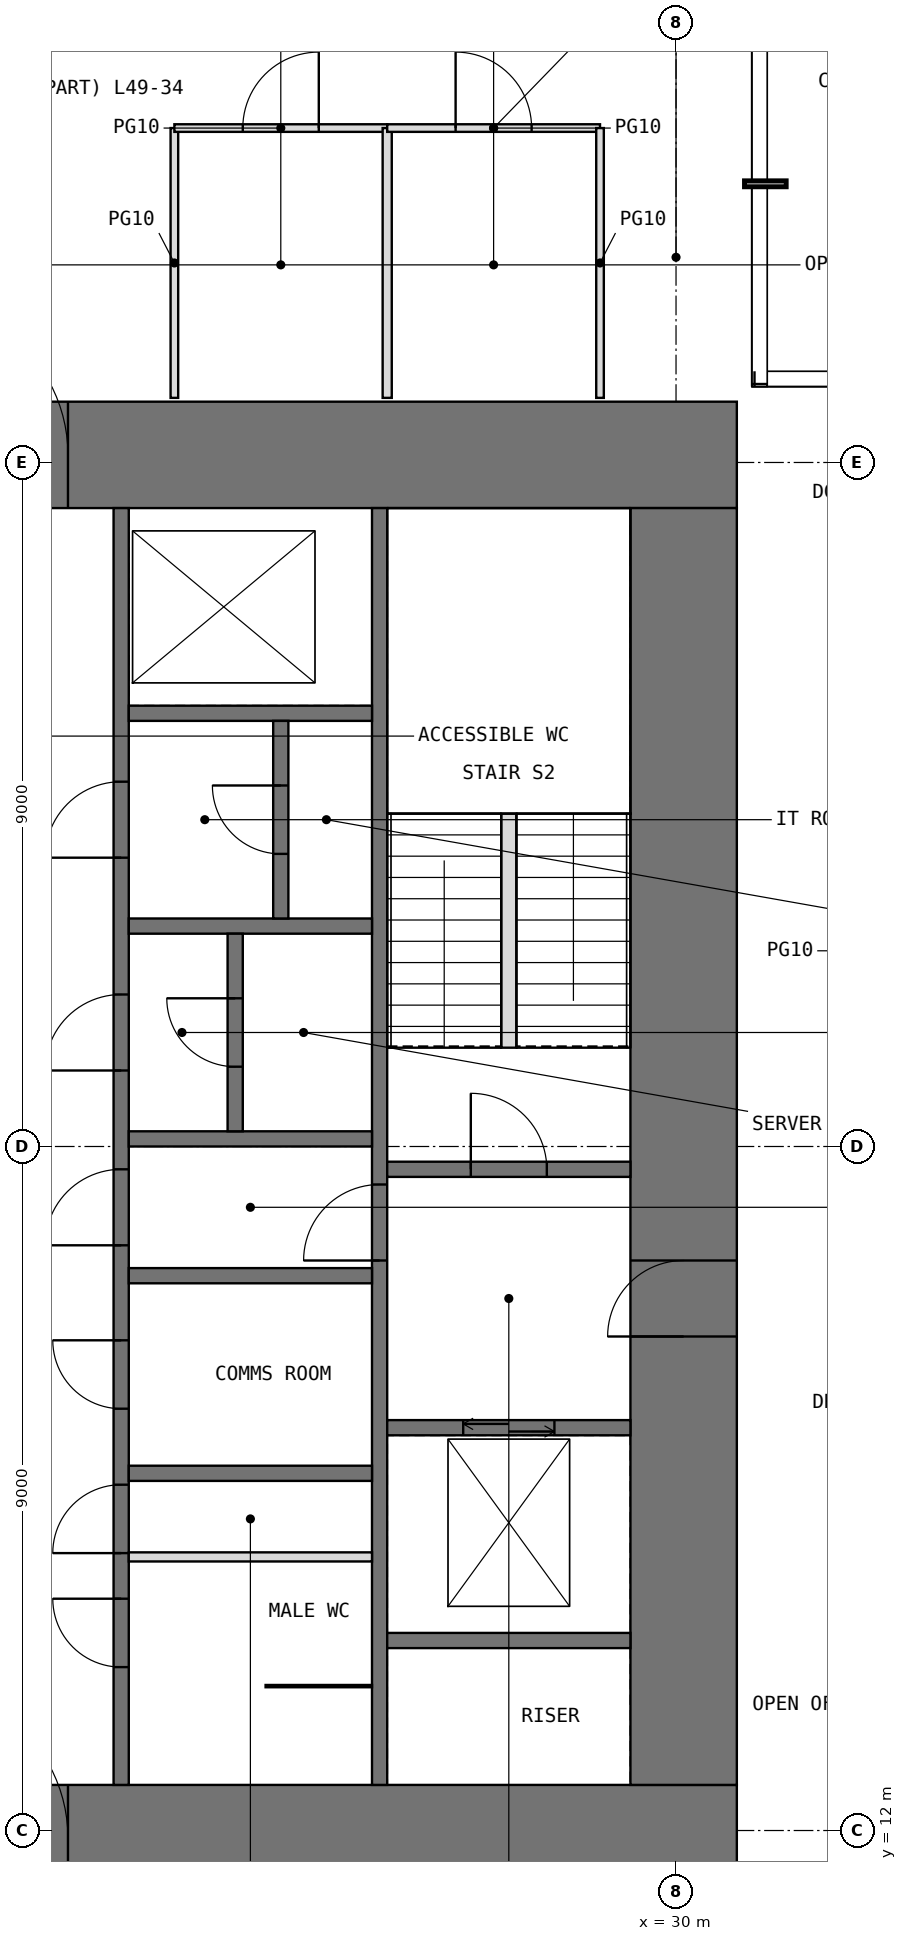
"""IFC4 building model, lengths in metres.
Left out: names, types, materials, properties, quantities, classifications, styles, units other than length and angle.
Written with IfcOpenShell. Run it as: python <this file> out.ifc"""

import sys

from ifc_helpers import new_model, si_unit, direction, frame, frame_2d, origin, place, context, subcontext, project, spatial, rectangle, extrude, element, fill, save


model = new_model("IFC4")
c1 = context("Model", 3, precision=1e-05, world=origin(), true_north=direction((0.0, 1.0)))
c2 = subcontext(c1, "Body", "Model", "MODEL_VIEW")
j1 = project(units=[si_unit("LENGTHUNIT", "METRE"), si_unit("PLANEANGLEUNIT", "RADIAN")], contexts=[c1])
p1 = place(None, origin())
s1 = spatial("IfcSite", under=j1, at=p1, CompositionType="ELEMENT")
p2 = place(p1, origin())
s2 = spatial("IfcBuilding", under=s1, at=p2, CompositionType="ELEMENT")
p3 = place(p2, frame((0.0, 0.0, 206.5)))
s3 = spatial("IfcBuildingStorey", under=s2, at=p3, CompositionType="ELEMENT", Elevation=206.5)
p4 = place(p3, frame((11.2, 11.9, -0.05), z_axis=(0.0, 0.0, 1.0), x_axis=(1.0, 0.0, 0.0)))
e1 = element("IfcWall", 1, at=p4, inside=s3, PredefinedType="SHEAR", context=c2, shape_type="SweptSolid", body=[
    extrude(rectangle(XDim=19.6, YDim=1.4, at=frame_2d((9.8, 0.0))), origin(), (0.0, 0.0, 1.0), 4.0),
])
p5 = place(p4, frame((8.8, 0.0, 0.05)))
e2 = element("IfcOpeningElement", 2, at=p5, cuts=e1, PredefinedType="OPENING", context=c2, shape_type="SweptSolid", body=[
    extrude(rectangle(XDim=2.0, YDim=2.2, at=frame_2d((1.0, 1.1))), frame((0.0, 0.71, 0.0), z_axis=(0.0, -1.0, 0.0), x_axis=(1.0, 0.0, 0.0)), (0.0, 0.0, 1.0), 1.42),
])
p6 = place(p3, frame((11.2, 30.1, -0.05), z_axis=(0.0, 0.0, 1.0), x_axis=(1.0, 0.0, 0.0)))
e3 = element("IfcWall", 3, at=p6, inside=s3, PredefinedType="SHEAR", context=c2, shape_type="SweptSolid", body=[
    extrude(rectangle(XDim=19.6, YDim=1.4, at=frame_2d((9.8, 0.0))), origin(), (0.0, 0.0, 1.0), 4.0),
])
p7 = place(p6, frame((8.8, 0.0, 0.05)))
e4 = element("IfcOpeningElement", 4, at=p7, cuts=e3, PredefinedType="OPENING", context=c2, shape_type="SweptSolid", body=[
    extrude(rectangle(XDim=2.0, YDim=2.2, at=frame_2d((1.0, 1.1))), frame((0.0, 0.71, 0.0), z_axis=(0.0, -1.0, 0.0), x_axis=(1.0, 0.0, 0.0)), (0.0, 0.0, 1.0), 1.42),
])
p8 = place(p3, frame((30.1, 12.6, -0.05), z_axis=(0.0, 0.0, 1.0), x_axis=(0.0, 1.0, 0.0)))
e5 = element("IfcWall", 5, at=p8, inside=s3, PredefinedType="SHEAR", context=c2, shape_type="SweptSolid", body=[
    extrude(rectangle(XDim=16.8, YDim=1.4, at=frame_2d((8.4, 0.0))), origin(), (0.0, 0.0, 1.0), 4.0),
])
p9 = place(p8, frame((5.9, 0.0, 0.05)))
e6 = element("IfcOpeningElement", 6, at=p9, cuts=e5, PredefinedType="OPENING", context=c2, shape_type="SweptSolid", body=[
    extrude(rectangle(XDim=1.0, YDim=2.2, at=frame_2d((0.5, 1.1))), frame((0.0, 0.71, 0.0), z_axis=(0.0, -1.0, 0.0), x_axis=(1.0, 0.0, 0.0)), (0.0, 0.0, 1.0), 1.42),
])
p10 = place(p3, frame((22.7, 12.6, -0.05), z_axis=(0.0, 0.0, 1.0), x_axis=(0.0, 1.0, 0.0)))
e7 = element("IfcWall", 7, at=p10, inside=s3, PredefinedType="SHEAR", context=c2, shape_type="SweptSolid", body=[
    extrude(rectangle(XDim=16.8, YDim=0.2, at=frame_2d((8.4, 0.0))), origin(), (0.0, 0.0, 1.0), 4.0),
])
p11 = place(p10, frame((3.05, 0.0, 0.05)))
e8 = element("IfcOpeningElement", 8, at=p11, cuts=e7, PredefinedType="OPENING", context=c2, shape_type="SweptSolid", body=[
    extrude(rectangle(XDim=0.9, YDim=2.2, at=frame_2d((0.45, 1.1))), frame((0.0, 0.11, 0.0), z_axis=(0.0, -1.0, 0.0), x_axis=(1.0, 0.0, 0.0)), (0.0, 0.0, 1.0), 0.22),
])
p12 = place(p10, frame((7.1, 0.0, 0.05)))
e9 = element("IfcOpeningElement", 9, at=p12, cuts=e7, PredefinedType="OPENING", context=c2, shape_type="SweptSolid", body=[
    extrude(rectangle(XDim=1.0, YDim=2.2, at=frame_2d((0.5, 1.1))), frame((0.0, 0.11, 0.0), z_axis=(0.0, -1.0, 0.0), x_axis=(1.0, 0.0, 0.0)), (0.0, 0.0, 1.0), 0.22),
])
p13 = place(p10, frame((1.55, 0.0, 0.05)))
e10 = element("IfcOpeningElement", 10, at=p13, cuts=e7, PredefinedType="OPENING", context=c2, shape_type="SweptSolid", body=[
    extrude(rectangle(XDim=0.9, YDim=2.2, at=frame_2d((0.45, 1.1))), frame((0.0, 0.11, 0.0), z_axis=(0.0, -1.0, 0.0), x_axis=(1.0, 0.0, 0.0)), (0.0, 0.0, 1.0), 0.22),
])
p14 = place(p10, frame((4.95, 0.0, 0.05)))
e11 = element("IfcOpeningElement", 11, at=p14, cuts=e7, PredefinedType="OPENING", context=c2, shape_type="SweptSolid", body=[
    extrude(rectangle(XDim=0.9, YDim=2.2, at=frame_2d((0.45, 1.1))), frame((0.0, 0.11, 0.0), z_axis=(0.0, -1.0, 0.0), x_axis=(1.0, 0.0, 0.0)), (0.0, 0.0, 1.0), 0.22),
])
p15 = place(p10, frame((9.4, 0.0, 0.05)))
e12 = element("IfcOpeningElement", 12, at=p15, cuts=e7, PredefinedType="OPENING", context=c2, shape_type="SweptSolid", body=[
    extrude(rectangle(XDim=1.0, YDim=2.2, at=frame_2d((0.5, 1.1))), frame((0.0, 0.11, 0.0), z_axis=(0.0, -1.0, 0.0), x_axis=(1.0, 0.0, 0.0)), (0.0, 0.0, 1.0), 0.22),
])
p16 = place(p10, frame((12.2, 0.0, 0.05)))
e13 = element("IfcOpeningElement", 13, at=p16, cuts=e7, PredefinedType="OPENING", context=c2, shape_type="SweptSolid", body=[
    extrude(rectangle(XDim=1.0, YDim=2.2, at=frame_2d((0.5, 1.1))), frame((0.0, 0.11, 0.0), z_axis=(0.0, -1.0, 0.0), x_axis=(1.0, 0.0, 0.0)), (0.0, 0.0, 1.0), 0.22),
])
p17 = place(p3, frame((26.1, 12.6, -0.05), z_axis=(0.0, 0.0, 1.0), x_axis=(0.0, 1.0, 0.0)))
e14 = element("IfcWall", 14, at=p17, inside=s3, PredefinedType="SHEAR", context=c2, shape_type="SweptSolid", body=[
    extrude(rectangle(XDim=16.8, YDim=0.2, at=frame_2d((8.4, 0.0))), origin(), (0.0, 0.0, 1.0), 4.0),
])
p18 = place(p17, frame((6.9, 0.0, 0.05)))
e15 = element("IfcOpeningElement", 15, at=p18, cuts=e14, PredefinedType="OPENING", context=c2, shape_type="SweptSolid", body=[
    extrude(rectangle(XDim=1.0, YDim=2.2, at=frame_2d((0.5, 1.1))), frame((0.0, 0.11, 0.0), z_axis=(0.0, -1.0, 0.0), x_axis=(1.0, 0.0, 0.0)), (0.0, 0.0, 1.0), 0.22),
])
for number, where, z_axis, x_axis in (
    (16, (22.8, 16.7, -0.05), (0.0, 0.0, 1.0), (1.0, 0.0, 0.0)),
    (17, (22.8, 19.3, -0.05), (0.0, 0.0, 1.0), (1.0, 0.0, 0.0)),
    (18, (22.8, 21.1, -0.05), (0.0, 0.0, 1.0), (1.0, 0.0, 0.0)),
    (19, (22.8, 23.9, -0.05), (0.0, 0.0, 1.0), (1.0, 0.0, 0.0)),
    (20, (22.8, 26.7, -0.05), (0.0, 0.0, 1.0), (1.0, 0.0, 0.0)),
    (21, (26.2, 14.5, -0.05), (0.0, 0.0, 1.0), (1.0, 0.0, 0.0)),
):
    element("IfcWall", number, at=place(p3, frame(where, z_axis=z_axis, x_axis=x_axis)), inside=s3, PredefinedType="SHEAR", context=c2, shape_type="SweptSolid", body=[
        extrude(rectangle(XDim=3.2, YDim=0.2, at=frame_2d((1.6, 0.0))), origin(), (0.0, 0.0, 1.0), 4.0),
    ])
p19 = place(p3, frame((26.2, 17.3, -0.05), z_axis=(0.0, 0.0, 1.0), x_axis=(1.0, 0.0, 0.0)))
e22 = element("IfcWall", 22, at=p19, inside=s3, PredefinedType="SHEAR", context=c2, shape_type="SweptSolid", body=[
    extrude(rectangle(XDim=3.2, YDim=0.2, at=frame_2d((1.6, 0.0))), origin(), (0.0, 0.0, 1.0), 4.0),
])
p20 = place(p19, frame((1.0, 0.0, 0.05)))
e23 = element("IfcOpeningElement", 23, at=p20, cuts=e22, PredefinedType="OPENING", context=c2, shape_type="SweptSolid", body=[
    extrude(rectangle(XDim=1.2, YDim=2.2, at=frame_2d((0.6, 1.1))), frame((0.0, 0.11, 0.0), z_axis=(0.0, -1.0, 0.0), x_axis=(1.0, 0.0, 0.0)), (0.0, 0.0, 1.0), 0.22),
])
p21 = place(p3, frame((26.2, 20.7, -0.05), z_axis=(0.0, 0.0, 1.0), x_axis=(1.0, 0.0, 0.0)))
e24 = element("IfcWall", 24, at=p21, inside=s3, PredefinedType="SHEAR", context=c2, shape_type="SweptSolid", body=[
    extrude(rectangle(XDim=3.2, YDim=0.2, at=frame_2d((1.6, 0.0))), origin(), (0.0, 0.0, 1.0), 4.0),
])
p22 = place(p21, frame((1.1, 0.0, 0.05)))
e25 = element("IfcOpeningElement", 25, at=p22, cuts=e24, PredefinedType="OPENING", context=c2, shape_type="SweptSolid", body=[
    extrude(rectangle(XDim=1.0, YDim=2.2, at=frame_2d((0.5, 1.1))), frame((0.0, 0.11, 0.0), z_axis=(0.0, -1.0, 0.0), x_axis=(1.0, 0.0, 0.0)), (0.0, 0.0, 1.0), 0.22),
])
p23 = place(p3, frame((22.8, 15.6, 0.0), z_axis=(0.0, 0.0, 1.0), x_axis=(1.0, 0.0, 0.0)))
e26 = element("IfcWall", 26, at=p23, inside=s3, PredefinedType="PARTITIONING", context=c2, shape_type="SweptSolid", body=[
    extrude(rectangle(XDim=3.2, YDim=0.12, at=frame_2d((1.6, 0.0))), origin(), (0.0, 0.0, 1.0), 3.75),
])
p24 = place(p3, frame((24.6, 13.9, 0.0), z_axis=(0.0, 0.0, 1.0), x_axis=(1.0, 0.0, 0.0)))
e27 = element("IfcWall", 27, at=p24, inside=s3, PredefinedType="PARTITIONING", context=c2, shape_type="SweptSolid", body=[
    extrude(rectangle(XDim=1.4, YDim=0.03, at=frame_2d((0.7, 0.0))), origin(), (0.0, 0.0, 1.0), 3.75),
])
p25 = place(p3, frame((24.2, 21.2, -0.05), z_axis=(0.0, 0.0, 1.0), x_axis=(0.0, 1.0, 0.0)))
e28 = element("IfcWall", 28, at=p25, inside=s3, PredefinedType="SHEAR", context=c2, shape_type="SweptSolid", body=[
    extrude(rectangle(XDim=2.6, YDim=0.2, at=frame_2d((1.3, 0.0))), origin(), (0.0, 0.0, 1.0), 4.0),
])
p26 = place(p25, frame((0.85, 0.0, 0.05)))
e29 = element("IfcOpeningElement", 29, at=p26, cuts=e28, PredefinedType="OPENING", context=c2, shape_type="SweptSolid", body=[
    extrude(rectangle(XDim=0.9, YDim=2.2, at=frame_2d((0.45, 1.1))), frame((0.0, 0.11, 0.0), z_axis=(0.0, -1.0, 0.0), x_axis=(1.0, 0.0, 0.0)), (0.0, 0.0, 1.0), 0.22),
])
p27 = place(p3, frame((24.8, 24.0, -0.05), z_axis=(0.0, 0.0, 1.0), x_axis=(0.0, 1.0, 0.0)))
e30 = element("IfcWall", 30, at=p27, inside=s3, PredefinedType="SHEAR", context=c2, shape_type="SweptSolid", body=[
    extrude(rectangle(XDim=2.6, YDim=0.2, at=frame_2d((1.3, 0.0))), origin(), (0.0, 0.0, 1.0), 4.0),
])
p28 = place(p27, frame((0.85, 0.0, 0.05)))
e31 = element("IfcOpeningElement", 31, at=p28, cuts=e30, PredefinedType="OPENING", context=c2, shape_type="SweptSolid", body=[
    extrude(rectangle(XDim=0.9, YDim=2.2, at=frame_2d((0.45, 1.1))), frame((0.0, 0.11, 0.0), z_axis=(0.0, -1.0, 0.0), x_axis=(1.0, 0.0, 0.0)), (0.0, 0.0, 1.0), 0.22),
])
p29 = place(p3, frame((23.4, 30.85, 0.0), z_axis=(0.0, 0.0, 1.0), x_axis=(0.0, 1.0, 0.0)))
e32 = element("IfcWall", 32, at=p29, inside=s3, PredefinedType="PARTITIONING", context=c2, shape_type="SweptSolid", body=[
    extrude(rectangle(XDim=3.55, YDim=0.1, at=frame_2d((1.775, 0.0))), origin(), (0.0, 0.0, 1.0), 3.75),
])
p30 = place(p3, frame((23.4, 34.4, 0.0), z_axis=(0.0, 0.0, 1.0), x_axis=(1.0, 0.0, 0.0)))
e33 = element("IfcWall", 33, at=p30, inside=s3, PredefinedType="PARTITIONING", context=c2, shape_type="SweptSolid", body=[
    extrude(rectangle(XDim=2.8, YDim=0.1, at=frame_2d((1.4, 0.0))), origin(), (0.0, 0.0, 1.0), 3.75),
])
p31 = place(p30, frame((0.9, 0.0, 0.0)))
e34 = element("IfcOpeningElement", 34, at=p31, cuts=e33, PredefinedType="OPENING", context=c2, shape_type="SweptSolid", body=[
    extrude(rectangle(XDim=1.0, YDim=2.4, at=frame_2d((0.5, 1.2))), frame((0.0, 0.06, 0.0), z_axis=(0.0, -1.0, 0.0), x_axis=(1.0, 0.0, 0.0)), (0.0, 0.0, 1.0), 0.12),
])
p32 = place(p3, frame((26.2, 30.85, 0.0), z_axis=(0.0, 0.0, 1.0), x_axis=(0.0, 1.0, 0.0)))
e35 = element("IfcWall", 35, at=p32, inside=s3, PredefinedType="PARTITIONING", context=c2, shape_type="SweptSolid", body=[
    extrude(rectangle(XDim=3.55, YDim=0.12, at=frame_2d((1.775, 0.0))), origin(), (0.0, 0.0, 1.0), 3.75),
])
p33 = place(p3, frame((26.2, 34.4, 0.0), z_axis=(0.0, 0.0, 1.0), x_axis=(1.0, 0.0, 0.0)))
e36 = element("IfcWall", 36, at=p33, inside=s3, PredefinedType="PARTITIONING", context=c2, shape_type="SweptSolid", body=[
    extrude(rectangle(XDim=2.8, YDim=0.1, at=frame_2d((1.4, 0.0))), origin(), (0.0, 0.0, 1.0), 3.75),
])
p34 = place(p33, frame((0.9, 0.0, 0.0)))
e37 = element("IfcOpeningElement", 37, at=p34, cuts=e36, PredefinedType="OPENING", context=c2, shape_type="SweptSolid", body=[
    extrude(rectangle(XDim=1.0, YDim=2.4, at=frame_2d((0.5, 1.2))), frame((0.0, 0.06, 0.0), z_axis=(0.0, -1.0, 0.0), x_axis=(1.0, 0.0, 0.0)), (0.0, 0.0, 1.0), 0.12),
])
p35 = place(p3, frame((29.0, 30.85, 0.0), z_axis=(0.0, 0.0, 1.0), x_axis=(0.0, 1.0, 0.0)))
e38 = element("IfcWall", 38, at=p35, inside=s3, PredefinedType="PARTITIONING", context=c2, shape_type="SweptSolid", body=[
    extrude(rectangle(XDim=3.55, YDim=0.1, at=frame_2d((1.775, 0.0))), origin(), (0.0, 0.0, 1.0), 3.75),
])
p36 = place(p3, frame((27.8, 22.3, 0.0), z_axis=(0.0, 0.0, 1.0), x_axis=(0.0, 1.0, 0.0)))
e39 = element("IfcWall", 39, at=p36, inside=s3, PredefinedType="PARTITIONING", context=c2, shape_type="SweptSolid", body=[
    extrude(rectangle(XDim=3.08, YDim=0.2, at=frame_2d((1.54, 0.0))), origin(), (0.0, 0.0, 1.0), 4.0),
])
p37 = place(p5, origin())
e40 = element("IfcDoor", 40, at=p37, inside=s3, OperationType="DOUBLE_DOOR_SINGLE_SWING", PredefinedType="DOOR", context=c2, shape_type="SweptSolid", body=[
    extrude(rectangle(XDim=2.0, YDim=2.2, at=frame_2d((1.0, 1.1))), frame((0.0, 0.025, 0.0), z_axis=(0.0, -1.0, 0.0), x_axis=(1.0, 0.0, 0.0)), (0.0, 0.0, 1.0), 0.05),
])
fill(e2, e40)
p38 = place(p7, origin())
e41 = element("IfcDoor", 41, at=p38, inside=s3, OperationType="DOUBLE_DOOR_SINGLE_SWING", PredefinedType="DOOR", context=c2, shape_type="SweptSolid", body=[
    extrude(rectangle(XDim=2.0, YDim=2.2, at=frame_2d((1.0, 1.1))), frame((0.0, 0.025, 0.0), z_axis=(0.0, -1.0, 0.0), x_axis=(1.0, 0.0, 0.0)), (0.0, 0.0, 1.0), 0.05),
])
fill(e4, e41)
p39 = place(p11, origin())
e42 = element("IfcDoor", 42, at=p39, inside=s3, OperationType="SINGLE_SWING_LEFT", PredefinedType="DOOR", context=c2, shape_type="SweptSolid", body=[
    extrude(rectangle(XDim=0.9, YDim=2.2, at=frame_2d((0.45, 1.1))), frame((0.0, 0.025, 0.0), z_axis=(0.0, -1.0, 0.0), x_axis=(1.0, 0.0, 0.0)), (0.0, 0.0, 1.0), 0.05),
])
fill(e8, e42)
p40 = place(p9, origin())
e43 = element("IfcDoor", 43, at=p40, inside=s3, OperationType="SINGLE_SWING_LEFT", PredefinedType="DOOR", context=c2, shape_type="SweptSolid", body=[
    extrude(rectangle(XDim=1.0, YDim=2.2, at=frame_2d((0.5, 1.1))), frame((0.0, 0.025, 0.0), z_axis=(0.0, -1.0, 0.0), x_axis=(1.0, 0.0, 0.0)), (0.0, 0.0, 1.0), 0.05),
])
fill(e6, e43)
p41 = place(p22, origin())
e44 = element("IfcDoor", 44, at=p41, inside=s3, OperationType="SINGLE_SWING_LEFT", PredefinedType="DOOR", context=c2, shape_type="SweptSolid", body=[
    extrude(rectangle(XDim=1.0, YDim=2.2, at=frame_2d((0.5, 1.1))), frame((0.0, 0.025, 0.0), z_axis=(0.0, -1.0, 0.0), x_axis=(1.0, 0.0, 0.0)), (0.0, 0.0, 1.0), 0.05),
])
fill(e25, e44)
p42 = place(p18, origin())
e45 = element("IfcDoor", 45, at=p42, inside=s3, OperationType="SINGLE_SWING_LEFT", PredefinedType="DOOR", context=c2, shape_type="SweptSolid", body=[
    extrude(rectangle(XDim=1.0, YDim=2.2, at=frame_2d((0.5, 1.1))), frame((0.0, 0.025, 0.0), z_axis=(0.0, -1.0, 0.0), x_axis=(1.0, 0.0, 0.0)), (0.0, 0.0, 1.0), 0.05),
])
fill(e15, e45)
p43 = place(p12, origin())
e46 = element("IfcDoor", 46, at=p43, inside=s3, OperationType="SINGLE_SWING_LEFT", PredefinedType="DOOR", context=c2, shape_type="SweptSolid", body=[
    extrude(rectangle(XDim=1.0, YDim=2.2, at=frame_2d((0.5, 1.1))), frame((0.0, 0.025, 0.0), z_axis=(0.0, -1.0, 0.0), x_axis=(1.0, 0.0, 0.0)), (0.0, 0.0, 1.0), 0.05),
])
fill(e9, e46)
p44 = place(p13, origin())
e47 = element("IfcDoor", 47, at=p44, inside=s3, OperationType="SINGLE_SWING_RIGHT", PredefinedType="DOOR", context=c2, shape_type="SweptSolid", body=[
    extrude(rectangle(XDim=0.9, YDim=2.2, at=frame_2d((0.45, 1.1))), frame((0.0, 0.025, 0.0), z_axis=(0.0, -1.0, 0.0), x_axis=(1.0, 0.0, 0.0)), (0.0, 0.0, 1.0), 0.05),
])
fill(e10, e47)
p45 = place(p14, origin())
e48 = element("IfcDoor", 48, at=p45, inside=s3, OperationType="SINGLE_SWING_RIGHT", PredefinedType="DOOR", context=c2, shape_type="SweptSolid", body=[
    extrude(rectangle(XDim=0.9, YDim=2.2, at=frame_2d((0.45, 1.1))), frame((0.0, 0.025, 0.0), z_axis=(0.0, -1.0, 0.0), x_axis=(1.0, 0.0, 0.0)), (0.0, 0.0, 1.0), 0.05),
])
fill(e11, e48)
p46 = place(p15, origin())
e49 = element("IfcDoor", 49, at=p46, inside=s3, OperationType="SINGLE_SWING_LEFT", PredefinedType="DOOR", context=c2, shape_type="SweptSolid", body=[
    extrude(rectangle(XDim=1.0, YDim=2.2, at=frame_2d((0.5, 1.1))), frame((0.0, 0.025, 0.0), z_axis=(0.0, -1.0, 0.0), x_axis=(1.0, 0.0, 0.0)), (0.0, 0.0, 1.0), 0.05),
])
fill(e12, e49)
p47 = place(p26, origin())
e50 = element("IfcDoor", 50, at=p47, inside=s3, OperationType="SINGLE_SWING_RIGHT", PredefinedType="DOOR", context=c2, shape_type="SweptSolid", body=[
    extrude(rectangle(XDim=0.9, YDim=2.2, at=frame_2d((0.45, 1.1))), frame((0.0, 0.025, 0.0), z_axis=(0.0, -1.0, 0.0), x_axis=(1.0, 0.0, 0.0)), (0.0, 0.0, 1.0), 0.05),
])
fill(e29, e50)
p48 = place(p16, origin())
e51 = element("IfcDoor", 51, at=p48, inside=s3, OperationType="SINGLE_SWING_LEFT", PredefinedType="DOOR", context=c2, shape_type="SweptSolid", body=[
    extrude(rectangle(XDim=1.0, YDim=2.2, at=frame_2d((0.5, 1.1))), frame((0.0, 0.025, 0.0), z_axis=(0.0, -1.0, 0.0), x_axis=(1.0, 0.0, 0.0)), (0.0, 0.0, 1.0), 0.05),
])
fill(e13, e51)
p49 = place(p28, origin())
e52 = element("IfcDoor", 52, at=p49, inside=s3, OperationType="SINGLE_SWING_RIGHT", PredefinedType="DOOR", context=c2, shape_type="SweptSolid", body=[
    extrude(rectangle(XDim=0.9, YDim=2.2, at=frame_2d((0.45, 1.1))), frame((0.0, 0.025, 0.0), z_axis=(0.0, -1.0, 0.0), x_axis=(1.0, 0.0, 0.0)), (0.0, 0.0, 1.0), 0.05),
])
fill(e31, e52)
p50 = place(p31, origin())
e53 = element("IfcDoor", 53, at=p50, inside=s3, OperationType="SINGLE_SWING_RIGHT", PredefinedType="DOOR", context=c2, shape_type="SweptSolid", body=[
    extrude(rectangle(XDim=1.0, YDim=2.4, at=frame_2d((0.5, 1.2))), frame((0.0, 0.025, 0.0), z_axis=(0.0, -1.0, 0.0), x_axis=(1.0, 0.0, 0.0)), (0.0, 0.0, 1.0), 0.05),
])
fill(e34, e53)
p51 = place(p34, origin())
e54 = element("IfcDoor", 54, at=p51, inside=s3, OperationType="SINGLE_SWING_LEFT", PredefinedType="DOOR", context=c2, shape_type="SweptSolid", body=[
    extrude(rectangle(XDim=1.0, YDim=2.4, at=frame_2d((0.5, 1.2))), frame((0.0, 0.025, 0.0), z_axis=(0.0, -1.0, 0.0), x_axis=(1.0, 0.0, 0.0)), (0.0, 0.0, 1.0), 0.05),
])
fill(e37, e54)
p52 = place(p20, origin())
e55 = element("IfcDoor", 55, at=p52, inside=s3, OperationType="DOUBLE_DOOR_SLIDING", PredefinedType="DOOR", context=c2, shape_type="SweptSolid", body=[
    extrude(rectangle(XDim=1.2, YDim=2.2, at=frame_2d((0.6, 1.1))), frame((0.0, 0.025, 0.0), z_axis=(0.0, -1.0, 0.0), x_axis=(1.0, 0.0, 0.0)), (0.0, 0.0, 1.0), 0.05),
])
fill(e23, e55)
save(model, sys.argv[1])
